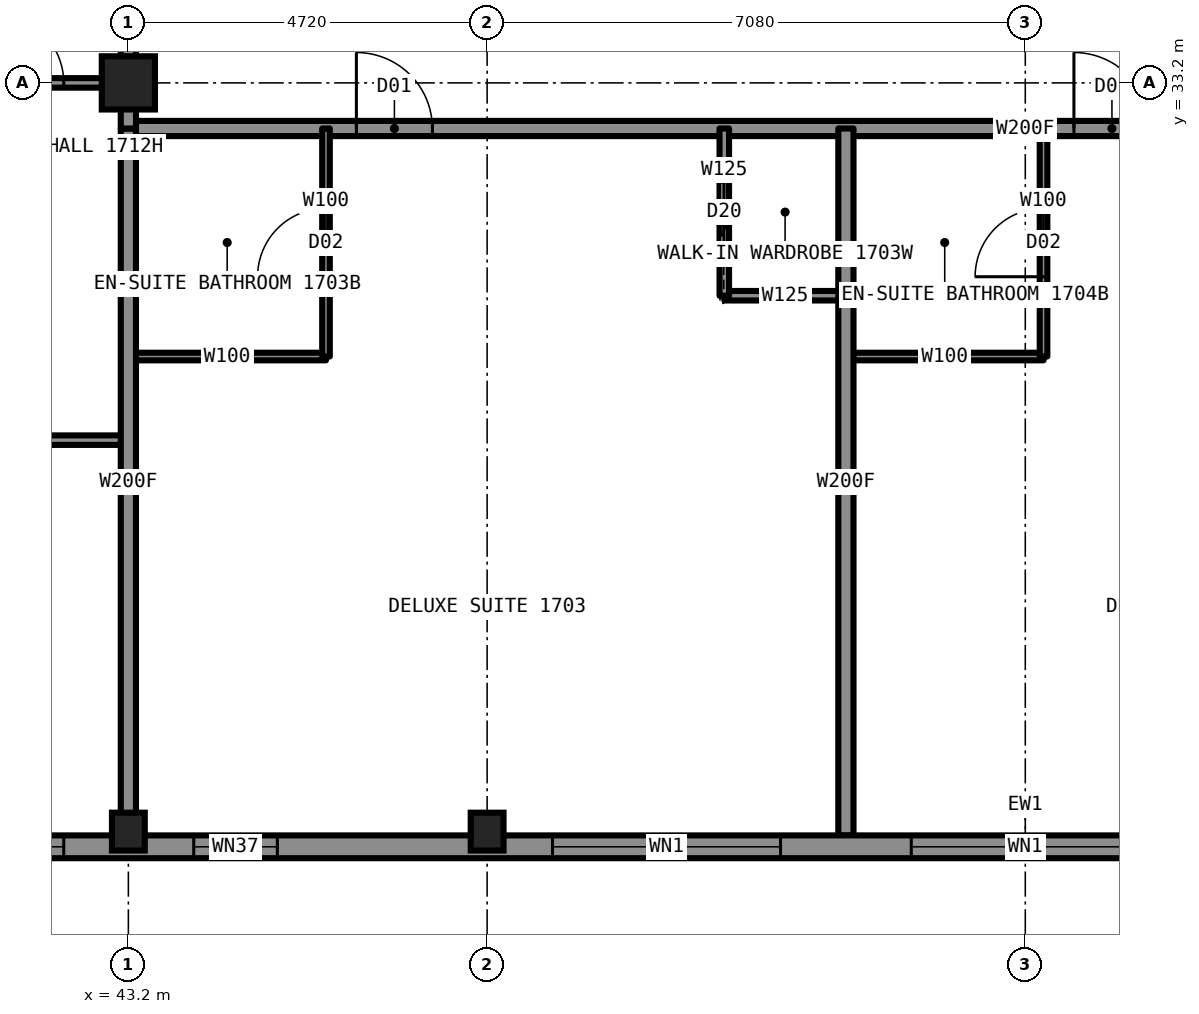
"""IFC4 building model, lengths in metres.
Left out: names, types, materials, properties, quantities, classifications, styles, units other than length and angle.
Written with IfcOpenShell. Run it as: python <this file> out.ifc"""

import sys

from ifc_helpers import new_model, si_unit, direction, frame, frame_2d, origin, origin_2d, place, context, subcontext, project, spatial, rectangle, hollow_rectangle, i_section, extrude, element, fill, save


model = new_model("IFC4")
c1 = context("Model", 3, precision=1e-05, world=origin(), true_north=direction((0.0, 1.0)))
c2 = subcontext(c1, "Body", "Model", "MODEL_VIEW")
j1 = project(units=[si_unit("LENGTHUNIT", "METRE"), si_unit("PLANEANGLEUNIT", "RADIAN")], contexts=[c1])
p1 = place(None, origin())
s1 = spatial("IfcSite", under=j1, at=p1, CompositionType="ELEMENT")
p2 = place(p1, origin())
s2 = spatial("IfcBuilding", under=s1, at=p2, CompositionType="ELEMENT")
p3 = place(p2, frame((0.0, 0.0, 60.0)))
s3 = spatial("IfcBuildingStorey", under=s2, at=p3, CompositionType="ELEMENT", Elevation=60.0)
for number, where, z_axis, x_axis in (
    (1, (43.2, 23.35, 0.0), (0.0, 0.0, 1.0), (1.0, 0.0, 0.0)),
    (2, (47.92, 23.35, 0.0), (0.0, 0.0, 1.0), (1.0, 0.0, 0.0)),
):
    element("IfcColumn", number, at=place(p3, frame(where, z_axis=z_axis, x_axis=x_axis)), inside=s3, PredefinedType="COLUMN", context=c2, shape_type="SweptSolid", body=[
        extrude(i_section(OverallWidth=0.432, OverallDepth=0.498, WebThickness=0.056, FlangeThickness=0.089, at=origin_2d()), origin(), (0.0, 0.0, 1.0), 3.5),
    ])
p4 = place(p3, frame((43.2, 33.2, 0.0), z_axis=(0.0, 0.0, 1.0), x_axis=(1.0, 0.0, 0.0)))
e3 = element("IfcColumn", 3, at=p4, inside=s3, PredefinedType="COLUMN", context=c2, shape_type="SweptSolid", body=[
    extrude(hollow_rectangle(XDim=0.7, YDim=0.7, WallThickness=0.06, at=origin_2d()), origin(), (0.0, 0.0, 1.0), 3.5),
])
p5 = place(p3, frame((33.3, 33.2, 0.0), z_axis=(0.0, 0.0, 1.0), x_axis=(1.0, 0.0, 0.0)))
e4 = element("IfcWall", 4, at=p5, inside=s3, PredefinedType="PARTITIONING", context=c2, shape_type="SweptSolid", body=[
    extrude(rectangle(XDim=9.9, YDim=0.125, at=frame_2d((4.95, 0.0))), origin(), (0.0, 0.0, 1.0), 2.573),
])
p6 = place(p5, frame((8.15, 0.0, 0.0)))
e5 = element("IfcOpeningElement", 5, at=p6, cuts=e4, PredefinedType="OPENING", context=c2, shape_type="SweptSolid", body=[
    extrude(rectangle(XDim=0.9, YDim=2.2, at=frame_2d((0.45, 1.1))), frame((0.0, 0.073, 0.0), z_axis=(0.0, -1.0, 0.0), x_axis=(1.0, 0.0, 0.0)), (0.0, 0.0, 1.0), 0.145),
])
p7 = place(p3, frame((43.2, 32.6, 0.0), z_axis=(0.0, 0.0, 1.0), x_axis=(1.0, 0.0, 0.0)))
e6 = element("IfcWall", 6, at=p7, inside=s3, PredefinedType="PARTITIONING", context=c2, shape_type="SweptSolid", body=[
    extrude(rectangle(XDim=23.6, YDim=0.2, at=frame_2d((11.8, 0.0))), origin(), (0.0, 0.0, 1.0), 3.33),
])
p8 = place(p7, frame((3.0, 0.0, 0.0)))
e7 = element("IfcOpeningElement", 7, at=p8, cuts=e6, PredefinedType="OPENING", context=c2, shape_type="SweptSolid", body=[
    extrude(rectangle(XDim=1.0, YDim=2.2, at=frame_2d((0.5, 1.1))), frame((0.0, 0.11, 0.0), z_axis=(0.0, -1.0, 0.0), x_axis=(1.0, 0.0, 0.0)), (0.0, 0.0, 1.0), 0.22),
])
p9 = place(p7, frame((12.44, 0.0, 0.0)))
e8 = element("IfcOpeningElement", 8, at=p9, cuts=e6, PredefinedType="OPENING", context=c2, shape_type="SweptSolid", body=[
    extrude(rectangle(XDim=1.0, YDim=2.2, at=frame_2d((0.5, 1.1))), frame((0.0, 0.11, 0.0), z_axis=(0.0, -1.0, 0.0), x_axis=(1.0, 0.0, 0.0)), (0.0, 0.0, 1.0), 0.22),
])
p10 = place(p7, frame((20.34, 0.0, 0.0)))
e9 = element("IfcOpeningElement", 9, at=p10, cuts=e6, PredefinedType="OPENING", context=c2, shape_type="SweptSolid", body=[
    extrude(rectangle(XDim=1.0, YDim=2.2, at=frame_2d((0.5, 1.1))), frame((0.0, 0.11, 0.0), z_axis=(0.0, -1.0, 0.0), x_axis=(1.0, 0.0, 0.0)), (0.0, 0.0, 1.0), 0.22),
])
p11 = place(p3, frame((51.04, 30.4, 0.0), z_axis=(0.0, 0.0, 1.0), x_axis=(1.0, 0.0, 0.0)))
e10 = element("IfcWall", 10, at=p11, inside=s3, PredefinedType="PARTITIONING", context=c2, shape_type="SweptSolid", body=[
    extrude(rectangle(XDim=1.6, YDim=0.125, at=frame_2d((0.8, 0.0))), origin(), (0.0, 0.0, 1.0), 3.33),
])
for number, where, z_axis, x_axis in (
    (11, (43.2, 29.6, 0.0), (0.0, 0.0, 1.0), (1.0, 0.0, 0.0)),
    (12, (52.64, 29.6, 0.0), (0.0, 0.0, 1.0), (1.0, 0.0, 0.0)),
):
    element("IfcWall", number, at=place(p3, frame(where, z_axis=z_axis, x_axis=x_axis)), inside=s3, PredefinedType="PARTITIONING", context=c2, shape_type="SweptSolid", body=[
        extrude(rectangle(XDim=2.6, YDim=0.1, at=frame_2d((1.3, 0.0))), origin(), (0.0, 0.0, 1.0), 3.33),
    ])
p12 = place(p3, frame((33.306, 28.5, 0.0), z_axis=(0.0, 0.0, 1.0), x_axis=(1.0, 0.0, 0.0)))
e13 = element("IfcWall", 13, at=p12, inside=s3, PredefinedType="PARTITIONING", context=c2, shape_type="SweptSolid", body=[
    extrude(rectangle(XDim=9.894, YDim=0.125, at=frame_2d((4.947, 0.0))), origin(), (0.0, 0.0, 1.0), 3.33),
])
p13 = place(p12, frame((7.244, 0.0, 0.0)))
e14 = element("IfcOpeningElement", 14, at=p13, cuts=e13, PredefinedType="OPENING", context=c2, shape_type="SweptSolid", body=[
    extrude(rectangle(XDim=0.9, YDim=2.2, at=frame_2d((0.45, 1.1))), frame((0.0, 0.073, 0.0), z_axis=(0.0, -1.0, 0.0), x_axis=(1.0, 0.0, 0.0)), (0.0, 0.0, 1.0), 0.145),
])
p14 = place(p3, frame((43.2, 33.22, 0.0), z_axis=(0.0, 0.0, 1.0), x_axis=(0.0, 1.0, 0.0)))
e15 = element("IfcWall", 15, at=p14, inside=s3, PredefinedType="PARTITIONING", context=c2, shape_type="SweptSolid", body=[
    extrude(rectangle(XDim=23.58, YDim=0.2, at=frame_2d((11.79, 0.0))), origin(), (0.0, 0.0, 1.0), 3.33),
])
p15 = place(p14, frame((7.7, 0.0, 0.0)))
e16 = element("IfcOpeningElement", 16, at=p15, cuts=e15, PredefinedType="OPENING", context=c2, shape_type="SweptSolid", body=[
    extrude(rectangle(XDim=1.0, YDim=2.2, at=frame_2d((0.5, 1.1))), frame((0.0, 0.11, 0.0), z_axis=(0.0, -1.0, 0.0), x_axis=(1.0, 0.0, 0.0)), (0.0, 0.0, 1.0), 0.22),
])
p16 = place(p14, frame((16.4, 0.0, 0.0)))
e17 = element("IfcOpeningElement", 17, at=p16, cuts=e15, PredefinedType="OPENING", context=c2, shape_type="SweptSolid", body=[
    extrude(rectangle(XDim=1.0, YDim=2.2, at=frame_2d((0.5, 1.1))), frame((0.0, 0.11, 0.0), z_axis=(0.0, -1.0, 0.0), x_axis=(1.0, 0.0, 0.0)), (0.0, 0.0, 1.0), 0.22),
])
p17 = place(p14, frame((21.82, 0.0, 0.0)))
e18 = element("IfcOpeningElement", 18, at=p17, cuts=e15, PredefinedType="OPENING", context=c2, shape_type="SweptSolid", body=[
    extrude(rectangle(XDim=1.1, YDim=2.2, at=frame_2d((0.55, 1.1))), frame((0.0, 0.11, 0.0), z_axis=(0.0, -1.0, 0.0), x_axis=(1.0, 0.0, 0.0)), (0.0, 0.0, 1.0), 0.22),
])
p18 = place(p14, frame((0.64, 0.0, 0.0)))
e19 = element("IfcOpeningElement", 19, at=p18, cuts=e15, PredefinedType="OPENING", context=c2, shape_type="SweptSolid", body=[
    extrude(rectangle(XDim=1.1, YDim=2.2, at=frame_2d((0.55, 1.1))), frame((0.0, 0.11, 0.0), z_axis=(0.0, -1.0, 0.0), x_axis=(1.0, 0.0, 0.0)), (0.0, 0.0, 1.0), 0.22),
])
p19 = place(p3, frame((43.2, 23.3, 0.0), z_axis=(0.0, 0.0, 1.0), x_axis=(0.0, 1.0, 0.0)))
e20 = element("IfcWall", 20, at=p19, inside=s3, PredefinedType="PARTITIONING", context=c2, shape_type="SweptSolid", body=[
    extrude(rectangle(XDim=9.3, YDim=0.2, at=frame_2d((4.65, 0.0))), origin(), (0.0, 0.0, 1.0), 2.573),
])
p20 = place(p3, frame((52.64, 23.3, 0.0), z_axis=(0.0, 0.0, 1.0), x_axis=(0.0, 1.0, 0.0)))
e21 = element("IfcWall", 21, at=p20, inside=s3, PredefinedType="PARTITIONING", context=c2, shape_type="SweptSolid", body=[
    extrude(rectangle(XDim=9.3, YDim=0.2, at=frame_2d((4.65, 0.0))), origin(), (0.0, 0.0, 1.0), 3.33),
])
p21 = place(p3, frame((51.04, 30.4, 0.0), z_axis=(0.0, 0.0, 1.0), x_axis=(0.0, 1.0, 0.0)))
e22 = element("IfcWall", 22, at=p21, inside=s3, PredefinedType="PARTITIONING", context=c2, shape_type="SweptSolid", body=[
    extrude(rectangle(XDim=2.2, YDim=0.125, at=frame_2d((1.1, 0.0))), origin(), (0.0, 0.0, 1.0), 3.33),
])
p22 = place(p21, frame((0.7, 0.0, 0.0)))
e23 = element("IfcOpeningElement", 23, at=p22, cuts=e22, PredefinedType="OPENING", context=c2, shape_type="SweptSolid", body=[
    extrude(rectangle(XDim=0.8, YDim=2.1, at=frame_2d((0.4, 1.05))), frame((0.0, 0.073, 0.0), z_axis=(0.0, -1.0, 0.0), x_axis=(1.0, 0.0, 0.0)), (0.0, 0.0, 1.0), 0.145),
])
p23 = place(p3, frame((45.8, 29.6, 0.0), z_axis=(0.0, 0.0, 1.0), x_axis=(0.0, 1.0, 0.0)))
e24 = element("IfcWall", 24, at=p23, inside=s3, PredefinedType="PARTITIONING", context=c2, shape_type="SweptSolid", body=[
    extrude(rectangle(XDim=3.0, YDim=0.1, at=frame_2d((1.5, 0.0))), origin(), (0.0, 0.0, 1.0), 3.33),
])
p24 = place(p23, frame((1.05, 0.0, 0.0)))
e25 = element("IfcOpeningElement", 25, at=p24, cuts=e24, PredefinedType="OPENING", context=c2, shape_type="SweptSolid", body=[
    extrude(rectangle(XDim=0.9, YDim=2.1, at=frame_2d((0.45, 1.05))), frame((0.0, 0.06, 0.0), z_axis=(0.0, -1.0, 0.0), x_axis=(1.0, 0.0, 0.0)), (0.0, 0.0, 1.0), 0.12),
])
p25 = place(p3, frame((55.24, 29.6, 0.0), z_axis=(0.0, 0.0, 1.0), x_axis=(0.0, 1.0, 0.0)))
e26 = element("IfcWall", 26, at=p25, inside=s3, PredefinedType="PARTITIONING", context=c2, shape_type="SweptSolid", body=[
    extrude(rectangle(XDim=3.0, YDim=0.1, at=frame_2d((1.5, 0.0))), origin(), (0.0, 0.0, 1.0), 3.33),
])
p26 = place(p25, frame((1.05, 0.0, 0.0)))
e27 = element("IfcOpeningElement", 27, at=p26, cuts=e26, PredefinedType="OPENING", context=c2, shape_type="SweptSolid", body=[
    extrude(rectangle(XDim=0.9, YDim=2.1, at=frame_2d((0.45, 1.05))), frame((0.0, 0.06, 0.0), z_axis=(0.0, -1.0, 0.0), x_axis=(1.0, 0.0, 0.0)), (0.0, 0.0, 1.0), 0.12),
])
p27 = place(p3, frame((38.5, 23.15, 0.0), z_axis=(0.0, 0.0, 1.0), x_axis=(1.0, 0.0, 0.0)))
e28 = element("IfcWall", 28, at=p27, inside=s3, PredefinedType="SOLIDWALL", context=c2, shape_type="SweptSolid", body=[
    extrude(rectangle(XDim=33.0, YDim=0.3, at=frame_2d((16.5, 0.0))), origin(), (0.0, 0.0, 1.0), 2.83),
])
p28 = place(p27, frame((0.85, 0.0, 0.5)))
e29 = element("IfcOpeningElement", 29, at=p28, cuts=e28, PredefinedType="OPENING", context=c2, shape_type="SweptSolid", body=[
    extrude(rectangle(XDim=3.0, YDim=2.0, at=frame_2d((1.5, 1.0))), frame((0.0, 0.16, 0.0), z_axis=(0.0, -1.0, 0.0), x_axis=(1.0, 0.0, 0.0)), (0.0, 0.0, 1.0), 0.32),
])
p29 = place(p27, frame((5.56, 0.0, 0.5)))
e30 = element("IfcOpeningElement", 30, at=p29, cuts=e28, PredefinedType="OPENING", context=c2, shape_type="SweptSolid", body=[
    extrude(rectangle(XDim=3.0, YDim=2.0, at=frame_2d((1.5, 1.0))), frame((0.0, 0.16, 0.0), z_axis=(0.0, -1.0, 0.0), x_axis=(1.0, 0.0, 0.0)), (0.0, 0.0, 1.0), 0.32),
])
p30 = place(p27, frame((10.28, 0.0, 0.5)))
e31 = element("IfcOpeningElement", 31, at=p30, cuts=e28, PredefinedType="OPENING", context=c2, shape_type="SweptSolid", body=[
    extrude(rectangle(XDim=1.2, YDim=1.7, at=frame_2d((0.6, 0.85))), frame((0.0, 0.16, 0.0), z_axis=(0.0, -1.0, 0.0), x_axis=(1.0, 0.0, 0.0)), (0.0, 0.0, 1.0), 0.32),
])
p31 = place(p27, frame((15.0, 0.0, 0.5)))
e32 = element("IfcOpeningElement", 32, at=p31, cuts=e28, PredefinedType="OPENING", context=c2, shape_type="SweptSolid", body=[
    extrude(rectangle(XDim=3.0, YDim=2.0, at=frame_2d((1.5, 1.0))), frame((0.0, 0.16, 0.0), z_axis=(0.0, -1.0, 0.0), x_axis=(1.0, 0.0, 0.0)), (0.0, 0.0, 1.0), 0.32),
])
p32 = place(p27, frame((21.52, 0.0, 0.5)))
e33 = element("IfcOpeningElement", 33, at=p32, cuts=e28, PredefinedType="OPENING", context=c2, shape_type="SweptSolid", body=[
    extrude(rectangle(XDim=1.2, YDim=1.7, at=frame_2d((0.6, 0.85))), frame((0.0, 0.16, 0.0), z_axis=(0.0, -1.0, 0.0), x_axis=(1.0, 0.0, 0.0)), (0.0, 0.0, 1.0), 0.32),
])
p33 = place(p27, frame((24.44, 0.0, 0.5)))
e34 = element("IfcOpeningElement", 34, at=p33, cuts=e28, PredefinedType="OPENING", context=c2, shape_type="SweptSolid", body=[
    extrude(rectangle(XDim=3.0, YDim=2.0, at=frame_2d((1.5, 1.0))), frame((0.0, 0.16, 0.0), z_axis=(0.0, -1.0, 0.0), x_axis=(1.0, 0.0, 0.0)), (0.0, 0.0, 1.0), 0.32),
])
p34 = place(p27, frame((29.15, 0.0, 0.5)))
e35 = element("IfcOpeningElement", 35, at=p34, cuts=e28, PredefinedType="OPENING", context=c2, shape_type="SweptSolid", body=[
    extrude(rectangle(XDim=3.0, YDim=2.0, at=frame_2d((1.5, 1.0))), frame((0.0, 0.16, 0.0), z_axis=(0.0, -1.0, 0.0), x_axis=(1.0, 0.0, 0.0)), (0.0, 0.0, 1.0), 0.32),
])
p35 = place(p27, frame((11.48, 0.0, 0.5)))
e36 = element("IfcOpeningElement", 36, at=p35, cuts=e28, PredefinedType="OPENING", context=c2, shape_type="SweptSolid", body=[
    extrude(rectangle(XDim=0.6, YDim=0.8, at=frame_2d((0.3, 0.4))), frame((0.0, 0.16, 0.0), z_axis=(0.0, -1.0, 0.0), x_axis=(1.0, 0.0, 0.0)), (0.0, 0.0, 1.0), 0.32),
])
p36 = place(p27, frame((20.87, 0.0, 0.5)))
e37 = element("IfcOpeningElement", 37, at=p36, cuts=e28, PredefinedType="OPENING", context=c2, shape_type="SweptSolid", body=[
    extrude(rectangle(XDim=0.6, YDim=0.8, at=frame_2d((0.3, 0.4))), frame((0.0, 0.16, 0.0), z_axis=(0.0, -1.0, 0.0), x_axis=(1.0, 0.0, 0.0)), (0.0, 0.0, 1.0), 0.32),
])
p37 = place(p3, frame((43.2, 32.6, 0.0), z_axis=(0.0, 0.0, 1.0), x_axis=(0.0, 1.0, 0.0)))
e38 = element("IfcWall", 38, at=p37, inside=s3, PredefinedType="PARTITIONING", context=c2, shape_type="SweptSolid", body=[
    extrude(rectangle(XDim=0.62, YDim=0.2, at=frame_2d((0.31, 0.0))), origin(), (0.0, 0.0, 1.0), 2.573),
])
p38 = place(p8, origin())
e39 = element("IfcDoor", 39, at=p38, inside=s3, OperationType="SINGLE_SWING_LEFT", PredefinedType="DOOR", context=c2, shape_type="SweptSolid", body=[
    extrude(rectangle(XDim=1.0, YDim=2.2, at=frame_2d((0.5, 1.1))), frame((0.0, 0.025, 0.0), z_axis=(0.0, -1.0, 0.0), x_axis=(1.0, 0.0, 0.0)), (0.0, 0.0, 1.0), 0.05),
])
fill(e7, e39)
p39 = place(p24, origin())
e40 = element("IfcDoor", 40, at=p39, inside=s3, OperationType="SINGLE_SWING_RIGHT", PredefinedType="DOOR", context=c2, shape_type="SweptSolid", body=[
    extrude(rectangle(XDim=0.9, YDim=2.1, at=frame_2d((0.45, 1.05))), frame((0.0, 0.025, 0.0), z_axis=(0.0, -1.0, 0.0), x_axis=(1.0, 0.0, 0.0)), (0.0, 0.0, 1.0), 0.05),
])
fill(e25, e40)
p40 = place(p22, origin())
e41 = element("IfcDoor", 41, at=p40, inside=s3, OperationType="SLIDING_TO_LEFT", PredefinedType="DOOR", context=c2, shape_type="SweptSolid", body=[
    extrude(rectangle(XDim=0.8, YDim=2.1, at=frame_2d((0.4, 1.05))), frame((0.0, 0.025, 0.0), z_axis=(0.0, -1.0, 0.0), x_axis=(1.0, 0.0, 0.0)), (0.0, 0.0, 1.0), 0.05),
])
fill(e23, e41)
p41 = place(p9, origin())
e42 = element("IfcDoor", 42, at=p41, inside=s3, OperationType="SINGLE_SWING_LEFT", PredefinedType="DOOR", context=c2, shape_type="SweptSolid", body=[
    extrude(rectangle(XDim=1.0, YDim=2.2, at=frame_2d((0.5, 1.1))), frame((0.0, 0.025, 0.0), z_axis=(0.0, -1.0, 0.0), x_axis=(1.0, 0.0, 0.0)), (0.0, 0.0, 1.0), 0.05),
])
fill(e8, e42)
p42 = place(p26, origin())
e43 = element("IfcDoor", 43, at=p42, inside=s3, OperationType="SINGLE_SWING_RIGHT", PredefinedType="DOOR", context=c2, shape_type="SweptSolid", body=[
    extrude(rectangle(XDim=0.9, YDim=2.1, at=frame_2d((0.45, 1.05))), frame((0.0, 0.025, 0.0), z_axis=(0.0, -1.0, 0.0), x_axis=(1.0, 0.0, 0.0)), (0.0, 0.0, 1.0), 0.05),
])
fill(e27, e43)
p43 = place(p6, origin())
e44 = element("IfcDoor", 44, at=p43, inside=s3, OperationType="SINGLE_SWING_LEFT", PredefinedType="DOOR", context=c2, shape_type="SweptSolid", body=[
    extrude(rectangle(XDim=0.9, YDim=2.2, at=frame_2d((0.45, 1.1))), frame((0.0, 0.025, 0.0), z_axis=(0.0, -1.0, 0.0), x_axis=(1.0, 0.0, 0.0)), (0.0, 0.0, 1.0), 0.05),
])
fill(e5, e44)
p44 = place(p28, origin())
e45 = element("IfcWindow", 45, at=p44, inside=s3, PartitioningType="SINGLE_PANEL", PredefinedType="WINDOW", context=c2, shape_type="SweptSolid", body=[
    extrude(rectangle(XDim=3.0, YDim=2.0, at=frame_2d((1.5, 1.0))), frame((0.0, 0.03, 0.0), z_axis=(0.0, -1.0, 0.0), x_axis=(1.0, 0.0, 0.0)), (0.0, 0.0, 1.0), 0.06),
])
fill(e29, e45)
p45 = place(p29, origin())
e46 = element("IfcWindow", 46, at=p45, inside=s3, PartitioningType="SINGLE_PANEL", PredefinedType="WINDOW", context=c2, shape_type="SweptSolid", body=[
    extrude(rectangle(XDim=3.0, YDim=2.0, at=frame_2d((1.5, 1.0))), frame((0.0, 0.03, 0.0), z_axis=(0.0, -1.0, 0.0), x_axis=(1.0, 0.0, 0.0)), (0.0, 0.0, 1.0), 0.06),
])
fill(e30, e46)
p46 = place(p30, origin())
e47 = element("IfcWindow", 47, at=p46, inside=s3, PartitioningType="SINGLE_PANEL", PredefinedType="WINDOW", context=c2, shape_type="SweptSolid", body=[
    extrude(rectangle(XDim=1.2, YDim=1.7, at=frame_2d((0.6, 0.85))), frame((0.0, 0.03, 0.0), z_axis=(0.0, -1.0, 0.0), x_axis=(1.0, 0.0, 0.0)), (0.0, 0.0, 1.0), 0.06),
])
fill(e31, e47)
p47 = place(p31, origin())
e48 = element("IfcWindow", 48, at=p47, inside=s3, PartitioningType="SINGLE_PANEL", PredefinedType="WINDOW", context=c2, shape_type="SweptSolid", body=[
    extrude(rectangle(XDim=3.0, YDim=2.0, at=frame_2d((1.5, 1.0))), frame((0.0, 0.03, 0.0), z_axis=(0.0, -1.0, 0.0), x_axis=(1.0, 0.0, 0.0)), (0.0, 0.0, 1.0), 0.06),
])
fill(e32, e48)
p48 = place(p35, origin())
e49 = element("IfcWindow", 49, at=p48, inside=s3, PartitioningType="SINGLE_PANEL", PredefinedType="WINDOW", context=c2, shape_type="SweptSolid", body=[
    extrude(rectangle(XDim=0.6, YDim=0.8, at=frame_2d((0.3, 0.4))), frame((0.0, 0.03, 0.0), z_axis=(0.0, -1.0, 0.0), x_axis=(1.0, 0.0, 0.0)), (0.0, 0.0, 1.0), 0.06),
])
fill(e36, e49)
save(model, sys.argv[1])
